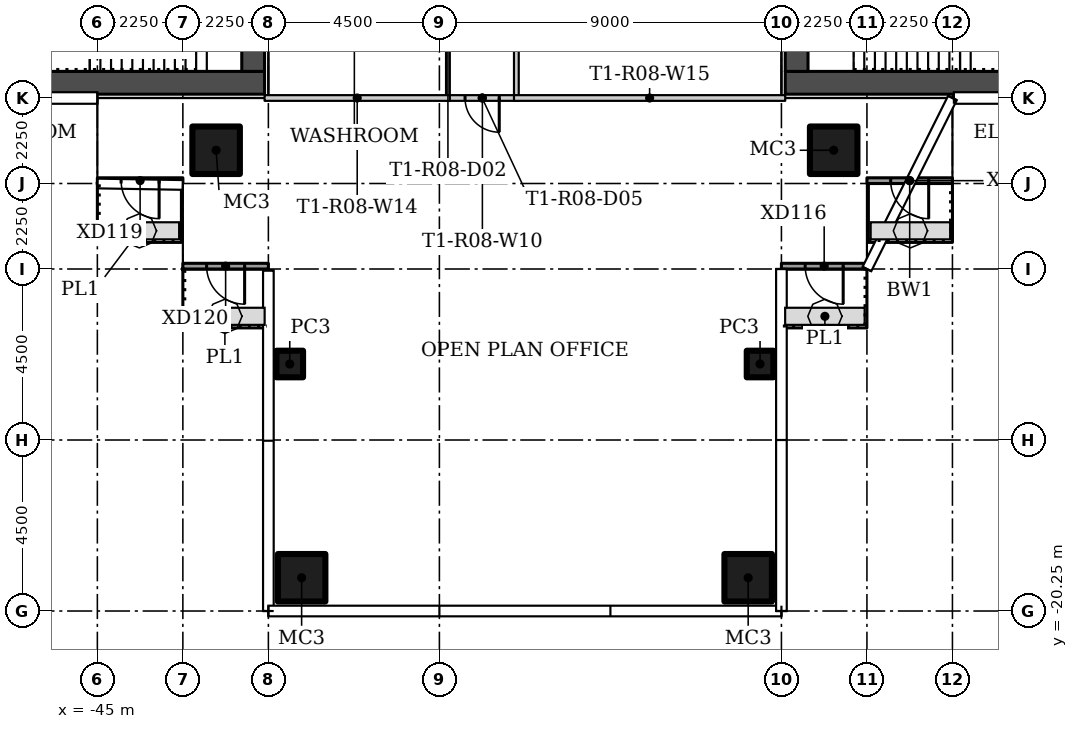
"""IFC4 building model, lengths in metres.
Left out: names, types, materials, properties, quantities, classifications, styles, units other than length and angle.
Written with IfcOpenShell. Run it as: python <this file> out.ifc"""

import sys

from ifc_helpers import new_model, si_unit, direction, frame, frame_2d, origin, origin_2d, place, context, subcontext, project, spatial, rectangle, hollow_rectangle, extrude, element, fill, save


model = new_model("IFC4")
c1 = context("Model", 3, precision=1e-05, world=origin(), true_north=direction((0.0, 1.0)))
c2 = subcontext(c1, "Body", "Model", "MODEL_VIEW")
j1 = project(units=[si_unit("LENGTHUNIT", "METRE"), si_unit("PLANEANGLEUNIT", "RADIAN")], contexts=[c1])
p1 = place(None, origin())
s1 = spatial("IfcSite", under=j1, at=p1, CompositionType="ELEMENT")
p2 = place(p1, origin())
s2 = spatial("IfcBuilding", under=s1, at=p2, CompositionType="ELEMENT")
p3 = place(p2, frame((0.0, 0.0, 85.8)))
s3 = spatial("IfcBuildingStorey", under=s2, at=p3, CompositionType="ELEMENT", Elevation=85.8)
for number, where in (
    (1, (-25.625, -8.125, 0.0)),
    (2, (-41.875, -8.125, 0.0)),
):
    element("IfcColumn", number, at=place(p3, frame(where)), inside=s3, PredefinedType="COLUMN", context=c2, shape_type="SweptSolid", body=[
        extrude(hollow_rectangle(XDim=1.25, YDim=1.25, WallThickness=0.05, at=origin_2d()), origin(), (0.0, 0.0, 1.0), 3.55),
    ])
p4 = place(p3, frame((-39.938, -13.75, 0.0)))
e3 = element("IfcColumn", 3, at=p4, inside=s3, PredefinedType="COLUMN", context=c2, shape_type="SweptSolid", body=[
    extrude(hollow_rectangle(XDim=0.7, YDim=0.7, WallThickness=0.025, at=origin_2d()), origin(), (0.0, 0.0, 1.0), 3.55),
])
p5 = place(p3, frame((-39.625, -19.375, 0.0)))
e4 = element("IfcColumn", 4, at=p5, inside=s3, PredefinedType="COLUMN", context=c2, shape_type="SweptSolid", body=[
    extrude(hollow_rectangle(XDim=1.25, YDim=1.25, WallThickness=0.05, at=origin_2d()), origin(), (0.0, 0.0, 1.0), 3.55),
])
p6 = place(p3, frame((-27.562, -13.75, 0.0)))
e5 = element("IfcColumn", 5, at=p6, inside=s3, PredefinedType="COLUMN", context=c2, shape_type="SweptSolid", body=[
    extrude(hollow_rectangle(XDim=0.7, YDim=0.7, WallThickness=0.025, at=origin_2d()), origin(), (0.0, 0.0, 1.0), 3.55),
])
p7 = place(p3, frame((-27.875, -19.375, 0.0)))
e6 = element("IfcColumn", 6, at=p7, inside=s3, PredefinedType="COLUMN", context=c2, shape_type="SweptSolid", body=[
    extrude(hollow_rectangle(XDim=1.25, YDim=1.25, WallThickness=0.05, at=origin_2d()), origin(), (0.0, 0.0, 1.0), 3.55),
])
p8 = place(p3, frame((-33.975, -0.013, 0.0), z_axis=(0.0, 0.0, 1.0), x_axis=(0.0, -1.0, 0.0)))
e7 = element("IfcWall", 7, at=p8, inside=s3, PredefinedType="PARTITIONING", context=c2, shape_type="SweptSolid", body=[
    extrude(rectangle(XDim=6.662, YDim=0.125, at=frame_2d((3.331, 0.0))), origin(), (0.0, 0.0, 1.0), 3.55),
])
p9 = place(p8, frame((2.887, 0.0, 0.0)))
e8 = element("IfcOpeningElement", 8, at=p9, cuts=e7, PredefinedType="OPENING", context=c2, shape_type="SweptSolid", body=[
    extrude(rectangle(XDim=0.9, YDim=2.1, at=frame_2d((0.45, 1.05))), frame((0.0, 0.073, 0.0), z_axis=(0.0, -1.0, 0.0), x_axis=(1.0, 0.0, 0.0)), (0.0, 0.0, 1.0), 0.145),
])
p10 = place(p3, frame((-35.775, -6.675, 0.0), z_axis=(0.0, 0.0, 1.0), x_axis=(0.0, 1.0, 0.0)))
e9 = element("IfcWall", 9, at=p10, inside=s3, PredefinedType="PARTITIONING", context=c2, shape_type="SweptSolid", body=[
    extrude(rectangle(XDim=6.675, YDim=0.1, at=frame_2d((3.337, 0.0))), origin(), (0.0, 0.0, 1.0), 3.55),
])
p11 = place(p10, frame((1.35, 0.0, 0.0)))
e10 = element("IfcOpeningElement", 10, at=p11, cuts=e9, PredefinedType="OPENING", context=c2, shape_type="SweptSolid", body=[
    extrude(rectangle(XDim=0.9, YDim=2.1, at=frame_2d((0.45, 1.05))), frame((0.0, 0.06, 0.0), z_axis=(0.0, -1.0, 0.0), x_axis=(1.0, 0.0, 0.0)), (0.0, 0.0, 1.0), 0.12),
])
p12 = place(p3, frame((-33.912, -6.75, 0.0), z_axis=(0.0, 0.0, 1.0), x_axis=(-1.0, 0.0, 0.0)))
e11 = element("IfcWall", 11, at=p12, inside=s3, PredefinedType="PARTITIONING", context=c2, shape_type="SweptSolid", body=[
    extrude(rectangle(XDim=1.913, YDim=0.15, at=frame_2d((0.957, 0.0))), origin(), (0.0, 0.0, 1.0), 3.55),
])
p13 = place(p12, frame((0.513, 0.0, 0.0)))
e12 = element("IfcOpeningElement", 12, at=p13, cuts=e11, PredefinedType="OPENING", context=c2, shape_type="SweptSolid", body=[
    extrude(rectangle(XDim=0.9, YDim=2.1, at=frame_2d((0.45, 1.05))), frame((0.0, 0.085, 0.0), z_axis=(0.0, -1.0, 0.0), x_axis=(1.0, 0.0, 0.0)), (0.0, 0.0, 1.0), 0.17),
])
p14 = place(p3, frame((-40.6, -6.75, 0.0)))
e13 = element("IfcWall", 13, at=p14, inside=s3, PredefinedType="PARTITIONING", context=c2, shape_type="SweptSolid", body=[
    extrude(rectangle(XDim=4.875, YDim=0.15, at=frame_2d((2.438, 0.0))), origin(), (0.0, 0.0, 1.0), 3.55),
])
p15 = place(p3, frame((-34.037, -6.75, 0.0)))
e14 = element("IfcWall", 14, at=p15, inside=s3, PredefinedType="PARTITIONING", context=c2, shape_type="SweptSolid", body=[
    extrude(rectangle(XDim=7.137, YDim=0.15, at=frame_2d((3.569, 0.0))), origin(), (0.0, 0.0, 1.0), 3.55),
])
p16 = place(p3, frame((-22.5, -8.925, 0.0), z_axis=(0.0, 0.0, 1.0), x_axis=(-1.0, 0.0, 0.0)))
e15 = element("IfcWall", 15, at=p16, inside=s3, PredefinedType="SOLIDWALL", context=c2, shape_type="SweptSolid", body=[
    extrude(rectangle(XDim=2.25, YDim=0.15, at=frame_2d((1.125, 0.0))), origin(), (0.0, 0.0, 1.0), 3.45),
])
p17 = place(p16, frame((0.625, 0.0, 0.0)))
e16 = element("IfcOpeningElement", 16, at=p17, cuts=e15, PredefinedType="OPENING", context=c2, shape_type="SweptSolid", body=[
    extrude(rectangle(XDim=1.0, YDim=2.4, at=frame_2d((0.5, 1.2))), frame((0.0, 0.085, 0.0), z_axis=(0.0, -1.0, 0.0), x_axis=(1.0, 0.0, 0.0)), (0.0, 0.0, 1.0), 0.17),
])
p18 = place(p3, frame((-24.75, -11.175, 0.0), z_axis=(0.0, 0.0, 1.0), x_axis=(-1.0, 0.0, 0.0)))
e17 = element("IfcWall", 17, at=p18, inside=s3, PredefinedType="SOLIDWALL", context=c2, shape_type="SweptSolid", body=[
    extrude(rectangle(XDim=2.25, YDim=0.15, at=frame_2d((1.125, 0.0))), origin(), (0.0, 0.0, 1.0), 3.45),
])
p19 = place(p18, frame((0.625, 0.0, 0.0)))
e18 = element("IfcOpeningElement", 18, at=p19, cuts=e17, PredefinedType="OPENING", context=c2, shape_type="SweptSolid", body=[
    extrude(rectangle(XDim=1.0, YDim=2.4, at=frame_2d((0.5, 1.2))), frame((0.0, 0.085, 0.0), z_axis=(0.0, -1.0, 0.0), x_axis=(1.0, 0.0, 0.0)), (0.0, 0.0, 1.0), 0.17),
])
p20 = place(p3, frame((-42.75, -8.925, 0.0), z_axis=(0.0, 0.0, 1.0), x_axis=(-1.0, 0.0, 0.0)))
e19 = element("IfcWall", 19, at=p20, inside=s3, PredefinedType="SOLIDWALL", context=c2, shape_type="SweptSolid", body=[
    extrude(rectangle(XDim=2.25, YDim=0.15, at=frame_2d((1.125, 0.0))), origin(), (0.0, 0.0, 1.0), 3.45),
])
p21 = place(p20, frame((0.625, 0.0, 0.0)))
e20 = element("IfcOpeningElement", 20, at=p21, cuts=e19, PredefinedType="OPENING", context=c2, shape_type="SweptSolid", body=[
    extrude(rectangle(XDim=1.0, YDim=2.4, at=frame_2d((0.5, 1.2))), frame((0.0, 0.085, 0.0), z_axis=(0.0, -1.0, 0.0), x_axis=(1.0, 0.0, 0.0)), (0.0, 0.0, 1.0), 0.17),
])
p22 = place(p3, frame((-40.5, -11.175, 0.0), z_axis=(0.0, 0.0, 1.0), x_axis=(-1.0, 0.0, 0.0)))
e21 = element("IfcWall", 21, at=p22, inside=s3, PredefinedType="SOLIDWALL", context=c2, shape_type="SweptSolid", body=[
    extrude(rectangle(XDim=2.25, YDim=0.15, at=frame_2d((1.125, 0.0))), origin(), (0.0, 0.0, 1.0), 3.45),
])
p23 = place(p22, frame((0.625, 0.0, 0.0)))
e22 = element("IfcOpeningElement", 22, at=p23, cuts=e21, PredefinedType="OPENING", context=c2, shape_type="SweptSolid", body=[
    extrude(rectangle(XDim=1.0, YDim=2.4, at=frame_2d((0.5, 1.2))), frame((0.0, 0.085, 0.0), z_axis=(0.0, -1.0, 0.0), x_axis=(1.0, 0.0, 0.0)), (0.0, 0.0, 1.0), 0.17),
])
p24 = place(p3, frame((-26.9, -6.35, 0.0)))
e23 = element("IfcWall", 23, at=p24, inside=s3, PredefinedType="SHEAR", context=c2, shape_type="SweptSolid", body=[
    extrude(rectangle(XDim=13.3, YDim=0.6, at=frame_2d((6.65, 0.0))), origin(), (0.0, 0.0, 1.0), 3.55),
])
p25 = place(p3, frame((-26.6, 6.05, 0.0), z_axis=(0.0, 0.0, 1.0), x_axis=(0.0, -1.0, 0.0)))
e24 = element("IfcWall", 24, at=p25, inside=s3, PredefinedType="SHEAR", context=c2, shape_type="SweptSolid", body=[
    extrude(rectangle(XDim=12.1, YDim=0.6, at=frame_2d((6.05, 0.0))), origin(), (0.0, 0.0, 1.0), 3.55),
])
p26 = place(p25, frame((3.9, 0.0, 0.0)))
e25 = element("IfcOpeningElement", 25, at=p26, cuts=e24, PredefinedType="OPENING", context=c2, shape_type="SweptSolid", body=[
    extrude(rectangle(XDim=1.8, YDim=2.4, at=frame_2d((0.9, 1.2))), frame((0.0, 0.31, 0.0), z_axis=(0.0, -1.0, 0.0), x_axis=(1.0, 0.0, 0.0)), (0.0, 0.0, 1.0), 0.62),
])
p27 = place(p3, frame((-40.6, -6.35, 0.0), z_axis=(0.0, 0.0, 1.0), x_axis=(-1.0, 0.0, 0.0)))
e26 = element("IfcWall", 26, at=p27, inside=s3, PredefinedType="SHEAR", context=c2, shape_type="SweptSolid", body=[
    extrude(rectangle(XDim=13.3, YDim=0.6, at=frame_2d((6.65, 0.0))), origin(), (0.0, 0.0, 1.0), 3.55),
])
p28 = place(p3, frame((-40.9, -6.05, 0.0), z_axis=(0.0, 0.0, 1.0), x_axis=(0.0, 1.0, 0.0)))
e27 = element("IfcWall", 27, at=p28, inside=s3, PredefinedType="SHEAR", context=c2, shape_type="SweptSolid", body=[
    extrude(rectangle(XDim=12.1, YDim=0.6, at=frame_2d((6.05, 0.0))), origin(), (0.0, 0.0, 1.0), 3.55),
])
p29 = place(p28, frame((6.4, 0.0, 0.0)))
e28 = element("IfcOpeningElement", 28, at=p29, cuts=e27, PredefinedType="OPENING", context=c2, shape_type="SweptSolid", body=[
    extrude(rectangle(XDim=1.8, YDim=2.4, at=frame_2d((0.9, 1.2))), frame((0.0, 0.31, 0.0), z_axis=(0.0, -1.0, 0.0), x_axis=(1.0, 0.0, 0.0)), (0.0, 0.0, 1.0), 0.62),
])
p30 = place(p13, origin())
e29 = element("IfcDoor", 29, at=p30, inside=s3, OperationType="SINGLE_SWING_RIGHT", PredefinedType="DOOR", context=c2, shape_type="SweptSolid", body=[
    extrude(rectangle(XDim=0.9, YDim=2.1, at=frame_2d((0.45, 1.05))), frame((0.0, 0.025, 0.0), z_axis=(0.0, -1.0, 0.0), x_axis=(1.0, 0.0, 0.0)), (0.0, 0.0, 1.0), 0.05),
])
fill(e12, e29)
p31 = place(p17, origin())
e30 = element("IfcDoor", 30, at=p31, inside=s3, OperationType="SINGLE_SWING_RIGHT", PredefinedType="DOOR", context=c2, shape_type="SweptSolid", body=[
    extrude(rectangle(XDim=1.0, YDim=2.4, at=frame_2d((0.5, 1.2))), frame((0.0, 0.025, 0.0), z_axis=(0.0, -1.0, 0.0), x_axis=(1.0, 0.0, 0.0)), (0.0, 0.0, 1.0), 0.05),
])
fill(e16, e30)
p32 = place(p19, origin())
e31 = element("IfcDoor", 31, at=p32, inside=s3, OperationType="SINGLE_SWING_LEFT", PredefinedType="DOOR", context=c2, shape_type="SweptSolid", body=[
    extrude(rectangle(XDim=1.0, YDim=2.4, at=frame_2d((0.5, 1.2))), frame((0.0, 0.025, 0.0), z_axis=(0.0, -1.0, 0.0), x_axis=(1.0, 0.0, 0.0)), (0.0, 0.0, 1.0), 0.05),
])
fill(e18, e31)
p33 = place(p21, origin())
e32 = element("IfcDoor", 32, at=p33, inside=s3, OperationType="SINGLE_SWING_LEFT", PredefinedType="DOOR", context=c2, shape_type="SweptSolid", body=[
    extrude(rectangle(XDim=1.0, YDim=2.4, at=frame_2d((0.5, 1.2))), frame((0.0, 0.025, 0.0), z_axis=(0.0, -1.0, 0.0), x_axis=(1.0, 0.0, 0.0)), (0.0, 0.0, 1.0), 0.05),
])
fill(e20, e32)
p34 = place(p23, origin())
e33 = element("IfcDoor", 33, at=p34, inside=s3, OperationType="SINGLE_SWING_RIGHT", PredefinedType="DOOR", context=c2, shape_type="SweptSolid", body=[
    extrude(rectangle(XDim=1.0, YDim=2.4, at=frame_2d((0.5, 1.2))), frame((0.0, 0.025, 0.0), z_axis=(0.0, -1.0, 0.0), x_axis=(1.0, 0.0, 0.0)), (0.0, 0.0, 1.0), 0.05),
])
fill(e22, e33)
save(model, sys.argv[1])
